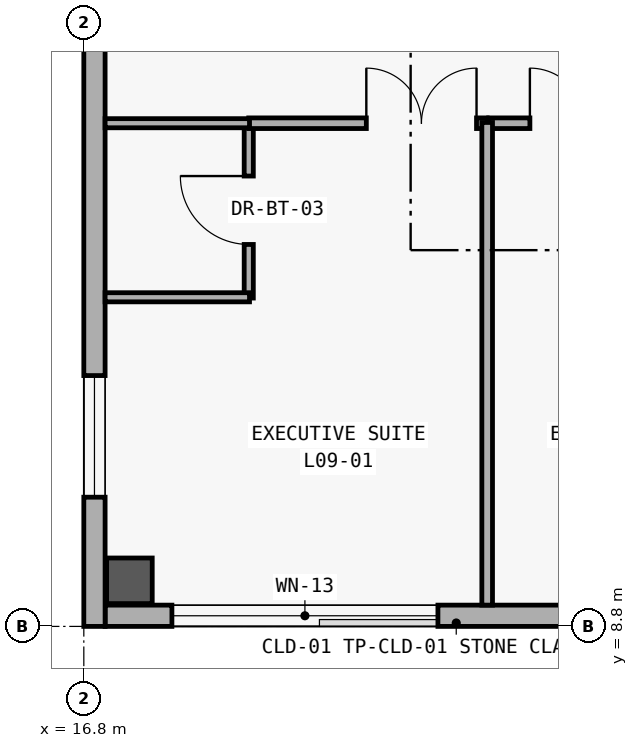
"""IFC4 building model, lengths in metres.
Left out: names, types, materials, properties, quantities, classifications, styles, units other than length and angle.
Written with IfcOpenShell. Run it as: python <this file> out.ifc"""

import sys

from ifc_helpers import new_model, si_unit, direction, frame, frame_2d, origin, origin_2d, place, context, subcontext, project, spatial, rectangle, extrude, element, fill, save


model = new_model("IFC4")
c1 = context("Model", 3, precision=1e-05, world=origin(), true_north=direction((0.0, 1.0)))
c2 = subcontext(c1, "Body", "Model", "MODEL_VIEW")
j1 = project(units=[si_unit("LENGTHUNIT", "METRE"), si_unit("PLANEANGLEUNIT", "RADIAN")], contexts=[c1])
p1 = place(None, origin())
s1 = spatial("IfcSite", under=j1, at=p1, CompositionType="ELEMENT")
p2 = place(p1, origin())
s2 = spatial("IfcBuilding", under=s1, at=p2, CompositionType="ELEMENT")
p3 = place(p2, frame((0.0, 0.0, 37.2)))
s3 = spatial("IfcBuildingStorey", under=s2, at=p3, CompositionType="ELEMENT", Elevation=37.2)
p4 = place(p3, frame((17.4, 9.4, 0.0), z_axis=(0.0, 0.0, 1.0), x_axis=(1.0, 0.0, 0.0)))
e1 = element("IfcColumn", 1, at=p4, inside=s3, PredefinedType="COLUMN", context=c2, shape_type="SweptSolid", body=[
    extrude(rectangle(XDim=0.6, YDim=0.6, at=origin_2d()), origin(), (0.0, 0.0, 1.0), 3.6),
])
p5 = place(p3, frame((75.32, 8.94, 0.0), z_axis=(0.0, 0.0, 1.0), x_axis=(-1.0, 0.0, 0.0)))
e2 = element("IfcWall", 2, at=p5, inside=s3, PredefinedType="SOLIDWALL", context=c2, shape_type="SweptSolid", body=[
    extrude(rectangle(XDim=58.24, YDim=0.28, at=frame_2d((29.12, 0.0))), origin(), (0.0, 0.0, 1.0), 3.34),
])
p6 = place(p5, frame((53.861, 0.0, 0.85)))
e3 = element("IfcOpeningElement", 3, at=p6, cuts=e2, PredefinedType="OPENING", context=c2, shape_type="SweptSolid", body=[
    extrude(rectangle(XDim=3.5, YDim=2.0, at=frame_2d((1.75, 1.0))), frame((0.0, 0.15, 0.0), z_axis=(0.0, -1.0, 0.0), x_axis=(1.0, 0.0, 0.0)), (0.0, 0.0, 1.0), 0.3),
])
p7 = place(p5, frame((50.095, 0.0, 0.85)))
e4 = element("IfcOpeningElement", 4, at=p7, cuts=e2, PredefinedType="OPENING", context=c2, shape_type="SweptSolid", body=[
    extrude(rectangle(XDim=1.4, YDim=1.6, at=frame_2d((0.7, 0.8))), frame((0.0, 0.15, 0.0), z_axis=(0.0, -1.0, 0.0), x_axis=(1.0, 0.0, 0.0)), (0.0, 0.0, 1.0), 0.3),
])
p8 = place(p5, frame((45.178, 0.0, 0.85)))
e5 = element("IfcOpeningElement", 5, at=p8, cuts=e2, PredefinedType="OPENING", context=c2, shape_type="SweptSolid", body=[
    extrude(rectangle(XDim=1.6, YDim=1.6, at=frame_2d((0.8, 0.8))), frame((0.0, 0.15, 0.0), z_axis=(0.0, -1.0, 0.0), x_axis=(1.0, 0.0, 0.0)), (0.0, 0.0, 1.0), 0.3),
])
p9 = place(p5, frame((40.261, 0.0, 0.85)))
e6 = element("IfcOpeningElement", 6, at=p9, cuts=e2, PredefinedType="OPENING", context=c2, shape_type="SweptSolid", body=[
    extrude(rectangle(XDim=1.8, YDim=1.6, at=frame_2d((0.9, 0.8))), frame((0.0, 0.15, 0.0), z_axis=(0.0, -1.0, 0.0), x_axis=(1.0, 0.0, 0.0)), (0.0, 0.0, 1.0), 0.3),
])
p10 = place(p5, frame((35.345, 0.0, 0.85)))
e7 = element("IfcOpeningElement", 7, at=p10, cuts=e2, PredefinedType="OPENING", context=c2, shape_type="SweptSolid", body=[
    extrude(rectangle(XDim=2.0, YDim=1.65, at=frame_2d((1.0, 0.825))), frame((0.0, 0.15, 0.0), z_axis=(0.0, -1.0, 0.0), x_axis=(1.0, 0.0, 0.0)), (0.0, 0.0, 1.0), 0.3),
])
p11 = place(p5, frame((30.428, 0.0, 0.85)))
e8 = element("IfcOpeningElement", 8, at=p11, cuts=e2, PredefinedType="OPENING", context=c2, shape_type="SweptSolid", body=[
    extrude(rectangle(XDim=2.2, YDim=1.65, at=frame_2d((1.1, 0.825))), frame((0.0, 0.15, 0.0), z_axis=(0.0, -1.0, 0.0), x_axis=(1.0, 0.0, 0.0)), (0.0, 0.0, 1.0), 0.3),
])
p12 = place(p5, frame((25.411, 0.0, 0.85)))
e9 = element("IfcOpeningElement", 9, at=p12, cuts=e2, PredefinedType="OPENING", context=c2, shape_type="SweptSolid", body=[
    extrude(rectangle(XDim=2.6, YDim=2.2, at=frame_2d((1.3, 1.1))), frame((0.0, 0.15, 0.0), z_axis=(0.0, -1.0, 0.0), x_axis=(1.0, 0.0, 0.0)), (0.0, 0.0, 1.0), 0.3),
])
p13 = place(p5, frame((20.345, 0.0, 0.85)))
e10 = element("IfcOpeningElement", 10, at=p13, cuts=e2, PredefinedType="OPENING", context=c2, shape_type="SweptSolid", body=[
    extrude(rectangle(XDim=3.1, YDim=2.2, at=frame_2d((1.55, 1.1))), frame((0.0, 0.15, 0.0), z_axis=(0.0, -1.0, 0.0), x_axis=(1.0, 0.0, 0.0)), (0.0, 0.0, 1.0), 0.3),
])
p14 = place(p5, frame((15.278, 0.0, 0.85)))
e11 = element("IfcOpeningElement", 11, at=p14, cuts=e2, PredefinedType="OPENING", context=c2, shape_type="SweptSolid", body=[
    extrude(rectangle(XDim=3.6, YDim=2.3, at=frame_2d((1.8, 1.15))), frame((0.0, 0.15, 0.0), z_axis=(0.0, -1.0, 0.0), x_axis=(1.0, 0.0, 0.0)), (0.0, 0.0, 1.0), 0.3),
])
p15 = place(p5, frame((11.636, 0.0, 0.85)))
e12 = element("IfcOpeningElement", 12, at=p15, cuts=e2, PredefinedType="OPENING", context=c2, shape_type="SweptSolid", body=[
    extrude(rectangle(XDim=1.25, YDim=1.45, at=frame_2d((0.625, 0.725))), frame((0.0, 0.15, 0.0), z_axis=(0.0, -1.0, 0.0), x_axis=(1.0, 0.0, 0.0)), (0.0, 0.0, 1.0), 0.3),
])
p16 = place(p5, frame((6.77, 0.0, 0.85)))
e13 = element("IfcOpeningElement", 13, at=p16, cuts=e2, PredefinedType="OPENING", context=c2, shape_type="SweptSolid", body=[
    extrude(rectangle(XDim=1.35, YDim=1.55, at=frame_2d((0.675, 0.775))), frame((0.0, 0.15, 0.0), z_axis=(0.0, -1.0, 0.0), x_axis=(1.0, 0.0, 0.0)), (0.0, 0.0, 1.0), 0.3),
])
p17 = place(p5, frame((1.904, 0.0, 0.85)))
e14 = element("IfcOpeningElement", 14, at=p17, cuts=e2, PredefinedType="OPENING", context=c2, shape_type="SweptSolid", body=[
    extrude(rectangle(XDim=1.45, YDim=1.65, at=frame_2d((0.725, 0.825))), frame((0.0, 0.15, 0.0), z_axis=(0.0, -1.0, 0.0), x_axis=(1.0, 0.0, 0.0)), (0.0, 0.0, 1.0), 0.3),
])
p18 = place(p3, frame((16.94, 8.8, 0.0), z_axis=(0.0, 0.0, 1.0), x_axis=(0.0, 1.0, 0.0)))
e15 = element("IfcWall", 15, at=p18, inside=s3, PredefinedType="SOLIDWALL", context=c2, shape_type="SweptSolid", body=[
    extrude(rectangle(XDim=25.2, YDim=0.28, at=frame_2d((12.6, 0.0))), origin(), (0.0, 0.0, 1.0), 3.34),
])
p19 = place(p18, frame((1.7, 0.0, 0.95)))
e16 = element("IfcOpeningElement", 16, at=p19, cuts=e15, PredefinedType="OPENING", context=c2, shape_type="SweptSolid", body=[
    extrude(rectangle(XDim=1.6, YDim=1.6, at=frame_2d((0.8, 0.8))), frame((0.0, 0.15, 0.0), z_axis=(0.0, -1.0, 0.0), x_axis=(1.0, 0.0, 0.0)), (0.0, 0.0, 1.0), 0.3),
])
p20 = place(p3, frame((18.97, 13.12, 0.0), z_axis=(0.0, 0.0, 1.0), x_axis=(0.0, 1.0, 0.0)))
e17 = element("IfcWall", 17, at=p20, inside=s3, PredefinedType="PARTITIONING", context=c2, shape_type="SweptSolid", body=[
    extrude(rectangle(XDim=2.31, YDim=0.12, at=frame_2d((1.155, 0.0))), origin(), (0.0, 0.0, 1.0), 2.48),
])
p21 = place(p20, frame((0.705, 0.0, 0.0)))
e18 = element("IfcOpeningElement", 18, at=p21, cuts=e17, PredefinedType="OPENING", context=c2, shape_type="SweptSolid", body=[
    extrude(rectangle(XDim=0.9, YDim=2.18, at=frame_2d((0.45, 1.09))), frame((0.0, 0.07, 0.0), z_axis=(0.0, -1.0, 0.0), x_axis=(1.0, 0.0, 0.0)), (0.0, 0.0, 1.0), 0.14),
])
p22 = place(p3, frame((18.97, 15.42, 0.0), z_axis=(0.0, 0.0, 1.0), x_axis=(1.0, 0.0, 0.0)))
e19 = element("IfcWall", 19, at=p22, inside=s3, PredefinedType="PARTITIONING", context=c2, shape_type="SweptSolid", body=[
    extrude(rectangle(XDim=3.137, YDim=0.14, at=frame_2d((1.568, 0.0))), origin(), (0.0, 0.0, 1.0), 2.48),
])
p23 = place(p22, frame((1.547, 0.0, 0.0)))
e20 = element("IfcOpeningElement", 20, at=p23, cuts=e19, PredefinedType="OPENING", context=c2, shape_type="SweptSolid", body=[
    extrude(rectangle(XDim=1.45, YDim=2.3, at=frame_2d((0.725, 1.15))), frame((0.0, 0.08, 0.0), z_axis=(0.0, -1.0, 0.0), x_axis=(1.0, 0.0, 0.0)), (0.0, 0.0, 1.0), 0.16),
])
p24 = place(p3, frame((22.127, 15.42, 0.0), z_axis=(0.0, 0.0, 1.0), x_axis=(1.0, 0.0, 0.0)))
e21 = element("IfcWall", 21, at=p24, inside=s3, PredefinedType="PARTITIONING", context=c2, shape_type="SweptSolid", body=[
    extrude(rectangle(XDim=3.136, YDim=0.14, at=frame_2d((1.568, 0.0))), origin(), (0.0, 0.0, 1.0), 2.48),
])
p25 = place(p24, frame((0.542, 0.0, 0.0)))
e22 = element("IfcOpeningElement", 22, at=p25, cuts=e21, PredefinedType="OPENING", context=c2, shape_type="SweptSolid", body=[
    extrude(rectangle(XDim=1.45, YDim=2.3, at=frame_2d((0.725, 1.15))), frame((0.0, 0.08, 0.0), z_axis=(0.0, -1.0, 0.0), x_axis=(1.0, 0.0, 0.0)), (0.0, 0.0, 1.0), 0.16),
])
for number, where, z_axis, x_axis in (
    (23, (17.08, 13.13, 0.0), (0.0, 0.0, 1.0), (1.0, 0.0, 0.0)),
    (24, (17.08, 15.42, 0.0), (0.0, 0.0, 1.0), (1.0, 0.0, 0.0)),
):
    element("IfcWall", number, at=place(p3, frame(where, z_axis=z_axis, x_axis=x_axis)), inside=s3, PredefinedType="PARTITIONING", context=c2, shape_type="SweptSolid", body=[
        extrude(rectangle(XDim=1.9, YDim=0.12, at=frame_2d((0.95, 0.0))), origin(), (0.0, 0.0, 1.0), 2.48),
    ])
p26 = place(p3, frame((22.107, 9.08, 0.0), z_axis=(0.0, 0.0, 1.0), x_axis=(0.0, 1.0, 0.0)))
e25 = element("IfcWall", 25, at=p26, inside=s3, PredefinedType="PARTITIONING", context=c2, shape_type="SweptSolid", body=[
    extrude(rectangle(XDim=6.35, YDim=0.14, at=frame_2d((3.175, 0.0))), origin(), (0.0, 0.0, 1.0), 2.48),
])
p27 = place(p6, origin())
e26 = element("IfcWindow", 26, at=p27, inside=s3, PartitioningType="SINGLE_PANEL", PredefinedType="WINDOW", context=c2, shape_type="SweptSolid", body=[
    extrude(rectangle(XDim=3.5, YDim=2.0, at=frame_2d((1.75, 1.0))), frame((0.0, 0.03, 0.0), z_axis=(0.0, -1.0, 0.0), x_axis=(1.0, 0.0, 0.0)), (0.0, 0.0, 1.0), 0.06),
])
fill(e3, e26)
p28 = place(p19, origin())
e27 = element("IfcWindow", 27, at=p28, inside=s3, PartitioningType="SINGLE_PANEL", PredefinedType="WINDOW", context=c2, shape_type="SweptSolid", body=[
    extrude(rectangle(XDim=1.6, YDim=1.6, at=frame_2d((0.8, 0.8))), frame((0.0, 0.03, 0.0), z_axis=(0.0, -1.0, 0.0), x_axis=(1.0, 0.0, 0.0)), (0.0, 0.0, 1.0), 0.06),
])
fill(e16, e27)
p29 = place(p21, origin())
e28 = element("IfcDoor", 28, at=p29, inside=s3, OperationType="SINGLE_SWING_RIGHT", PredefinedType="DOOR", context=c2, shape_type="SweptSolid", body=[
    extrude(rectangle(XDim=0.9, YDim=2.18, at=frame_2d((0.45, 1.09))), frame((0.0, 0.025, 0.0), z_axis=(0.0, -1.0, 0.0), x_axis=(1.0, 0.0, 0.0)), (0.0, 0.0, 1.0), 0.05),
])
fill(e18, e28)
p30 = place(p23, origin())
e29 = element("IfcDoor", 29, at=p30, inside=s3, OperationType="DOUBLE_DOOR_SINGLE_SWING", PredefinedType="DOOR", context=c2, shape_type="SweptSolid", body=[
    extrude(rectangle(XDim=1.45, YDim=2.3, at=frame_2d((0.725, 1.15))), frame((0.0, 0.025, 0.0), z_axis=(0.0, -1.0, 0.0), x_axis=(1.0, 0.0, 0.0)), (0.0, 0.0, 1.0), 0.05),
])
fill(e20, e29)
p31 = place(p25, origin())
e30 = element("IfcDoor", 30, at=p31, inside=s3, OperationType="DOUBLE_DOOR_SINGLE_SWING", PredefinedType="DOOR", context=c2, shape_type="SweptSolid", body=[
    extrude(rectangle(XDim=1.45, YDim=2.3, at=frame_2d((0.725, 1.15))), frame((0.0, 0.025, 0.0), z_axis=(0.0, -1.0, 0.0), x_axis=(1.0, 0.0, 0.0)), (0.0, 0.0, 1.0), 0.05),
])
fill(e22, e30)
save(model, sys.argv[1])
